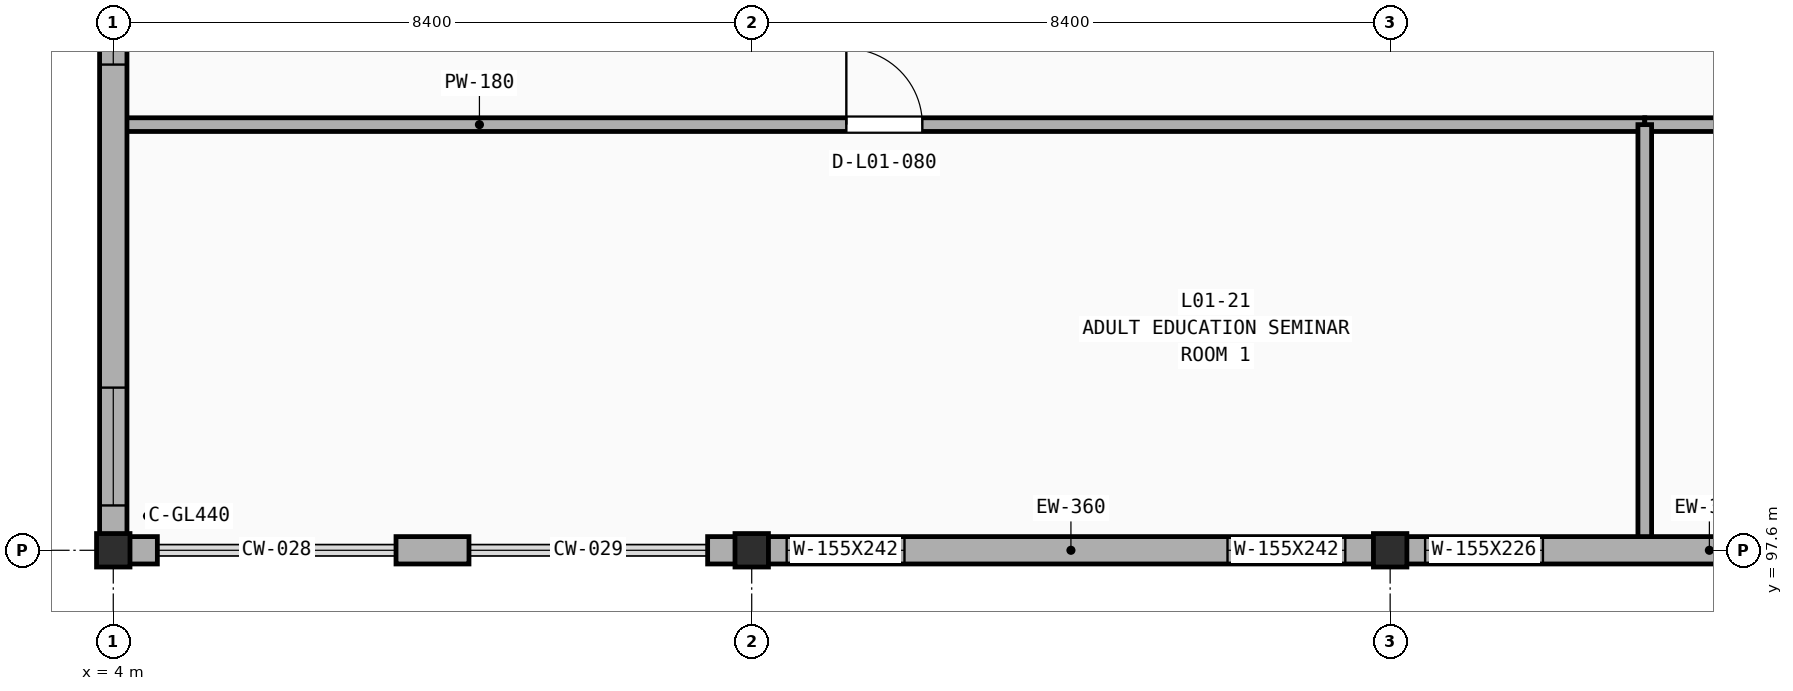
"""IFC4 building model, lengths in metres.
Left out: names, types, materials, properties, quantities, classifications, styles, units other than length and angle.
Written with IfcOpenShell. Run it as: python <this file> out.ifc"""

import sys

from ifc_helpers import new_model, si_unit, direction, frame, frame_2d, origin, origin_2d, place, context, subcontext, project, spatial, rectangle, extrude, element, fill, save


model = new_model("IFC4")
c1 = context("Model", 3, precision=1e-05, world=origin(), true_north=direction((0.0, 1.0)))
c2 = subcontext(c1, "Body", "Model", "MODEL_VIEW")
j1 = project(units=[si_unit("LENGTHUNIT", "METRE"), si_unit("PLANEANGLEUNIT", "RADIAN")], contexts=[c1])
p1 = place(None, origin())
s1 = spatial("IfcSite", under=j1, at=p1, CompositionType="ELEMENT")
p2 = place(p1, origin())
s2 = spatial("IfcBuilding", under=s1, at=p2, CompositionType="ELEMENT")
p3 = place(p2, frame((0.0, 0.0, 5.4)))
s3 = spatial("IfcBuildingStorey", under=s2, at=p3, CompositionType="ELEMENT", Elevation=5.4)
for number, where, z_axis, x_axis in (
    (1, (4.0, 97.6, 0.0), (0.0, 0.0, 1.0), (1.0, 0.0, 0.0)),
    (2, (12.4, 97.6, 0.0), (0.0, 0.0, 1.0), (1.0, 0.0, 0.0)),
    (3, (20.8, 97.6, 0.0), (0.0, 0.0, 1.0), (1.0, 0.0, 0.0)),
):
    element("IfcColumn", number, at=place(p3, frame(where, z_axis=z_axis, x_axis=x_axis)), inside=s3, PredefinedType="COLUMN", context=c2, shape_type="SweptSolid", body=[
        extrude(rectangle(XDim=0.44, YDim=0.44, at=origin_2d()), origin(), (0.0, 0.0, 1.0), 4.2),
    ])
p4 = place(p3, frame((4.14, 103.2, 0.0), z_axis=(0.0, 0.0, 1.0), x_axis=(1.0, 0.0, 0.0)))
e4 = element("IfcWall", 4, at=p4, inside=s3, PredefinedType="PARTITIONING", context=c2, shape_type="SweptSolid", body=[
    extrude(rectangle(XDim=20.01, YDim=0.18, at=frame_2d((10.005, 0.0))), origin(), (0.0, 0.0, 1.0), 3.37),
])
p5 = place(p4, frame((9.505, 0.0, -0.01)))
e5 = element("IfcOpeningElement", 5, at=p5, cuts=e4, PredefinedType="OPENING", context=c2, shape_type="SweptSolid", body=[
    extrude(rectangle(XDim=1.0, YDim=2.16, at=frame_2d((0.5, 1.08))), frame((0.0, 0.1, 0.0), z_axis=(0.0, -1.0, 0.0), x_axis=(1.0, 0.0, 0.0)), (0.0, 0.0, 1.0), 0.2),
])
p6 = place(p3, frame((24.15, 103.2, 0.0), z_axis=(0.0, 0.0, 1.0), x_axis=(1.0, 0.0, 0.0)))
e6 = element("IfcWall", 6, at=p6, inside=s3, PredefinedType="PARTITIONING", context=c2, shape_type="SweptSolid", body=[
    extrude(rectangle(XDim=20.2, YDim=0.18, at=frame_2d((10.1, 0.0))), origin(), (0.0, 0.0, 1.0), 3.37),
])
p7 = place(p6, frame((9.6, 0.0, -0.01)))
e7 = element("IfcOpeningElement", 7, at=p7, cuts=e6, PredefinedType="OPENING", context=c2, shape_type="SweptSolid", body=[
    extrude(rectangle(XDim=1.0, YDim=2.16, at=frame_2d((0.5, 1.08))), frame((0.0, 0.1, 0.0), z_axis=(0.0, -1.0, 0.0), x_axis=(1.0, 0.0, 0.0)), (0.0, 0.0, 1.0), 0.2),
])
p8 = place(p3, frame((24.15, 97.74, 0.0), z_axis=(0.0, 0.0, 1.0), x_axis=(0.0, 1.0, 0.0)))
e8 = element("IfcWall", 8, at=p8, inside=s3, PredefinedType="PARTITIONING", context=c2, shape_type="SweptSolid", body=[
    extrude(rectangle(XDim=5.46, YDim=0.18, at=frame_2d((2.73, 0.0))), origin(), (0.0, 0.0, 1.0), 3.52),
])
p9 = place(p3, frame((7.72, 97.6, 0.0), z_axis=(0.0, 0.0, 1.0), x_axis=(1.0, 0.0, 0.0)))
e9 = element("IfcWall", 9, at=p9, inside=s3, PredefinedType="SOLIDWALL", context=c2, shape_type="SweptSolid", body=[
    extrude(rectangle(XDim=0.96, YDim=0.36, at=frame_2d((0.48, 0.0))), origin(), (0.0, 0.0, 1.0), 3.31),
])
p10 = place(p3, frame((4.13, 97.6, 0.0), z_axis=(0.0, 0.0, 1.0), x_axis=(1.0, 0.0, 0.0)))
e10 = element("IfcWall", 10, at=p10, inside=s3, PredefinedType="SOLIDWALL", context=c2, shape_type="SweptSolid", body=[
    extrude(rectangle(XDim=0.45, YDim=0.36, at=frame_2d((0.225, 0.0))), origin(), (0.0, 0.0, 1.0), 3.31),
])
p11 = place(p3, frame((11.82, 97.6, 0.0), z_axis=(0.0, 0.0, 1.0), x_axis=(1.0, 0.0, 0.0)))
e11 = element("IfcWall", 11, at=p11, inside=s3, PredefinedType="SOLIDWALL", context=c2, shape_type="SweptSolid", body=[
    extrude(rectangle(XDim=0.45, YDim=0.36, at=frame_2d((0.225, 0.0))), origin(), (0.0, 0.0, 1.0), 3.31),
])
p12 = place(p3, frame((12.4, 97.6, 0.0), z_axis=(0.0, 0.0, 1.0), x_axis=(1.0, 0.0, 0.0)))
e12 = element("IfcWall", 12, at=p12, inside=s3, PredefinedType="SOLIDWALL", context=c2, shape_type="SweptSolid", body=[
    extrude(rectangle(XDim=8.4, YDim=0.36, at=frame_2d((4.2, 0.0))), origin(), (0.0, 0.0, 1.0), 3.31),
])
p13 = place(p12, frame((0.46, 0.0, 0.75)))
e13 = element("IfcOpeningElement", 13, at=p13, cuts=e12, PredefinedType="OPENING", context=c2, shape_type="SweptSolid", body=[
    extrude(rectangle(XDim=1.55, YDim=2.42, at=frame_2d((0.775, 1.21))), frame((0.0, 0.19, 0.0), z_axis=(0.0, -1.0, 0.0), x_axis=(1.0, 0.0, 0.0)), (0.0, 0.0, 1.0), 0.38),
])
p14 = place(p12, frame((6.26, 0.0, 0.75)))
e14 = element("IfcOpeningElement", 14, at=p14, cuts=e12, PredefinedType="OPENING", context=c2, shape_type="SweptSolid", body=[
    extrude(rectangle(XDim=1.55, YDim=2.42, at=frame_2d((0.775, 1.21))), frame((0.0, 0.19, 0.0), z_axis=(0.0, -1.0, 0.0), x_axis=(1.0, 0.0, 0.0)), (0.0, 0.0, 1.0), 0.38),
])
p15 = place(p3, frame((20.8, 97.6, 0.0), z_axis=(0.0, 0.0, 1.0), x_axis=(1.0, 0.0, 0.0)))
e15 = element("IfcWall", 15, at=p15, inside=s3, PredefinedType="SOLIDWALL", context=c2, shape_type="SweptSolid", body=[
    extrude(rectangle(XDim=8.4, YDim=0.36, at=frame_2d((4.2, 0.0))), origin(), (0.0, 0.0, 1.0), 3.15),
])
p16 = place(p15, frame((0.46, 0.0, 0.75)))
e16 = element("IfcOpeningElement", 16, at=p16, cuts=e15, PredefinedType="OPENING", context=c2, shape_type="SweptSolid", body=[
    extrude(rectangle(XDim=1.55, YDim=2.26, at=frame_2d((0.775, 1.13))), frame((0.0, 0.19, 0.0), z_axis=(0.0, -1.0, 0.0), x_axis=(1.0, 0.0, 0.0)), (0.0, 0.0, 1.0), 0.38),
])
p17 = place(p15, frame((6.26, 0.0, 0.75)))
e17 = element("IfcOpeningElement", 17, at=p17, cuts=e15, PredefinedType="OPENING", context=c2, shape_type="SweptSolid", body=[
    extrude(rectangle(XDim=1.55, YDim=2.26, at=frame_2d((0.775, 1.13))), frame((0.0, 0.19, 0.0), z_axis=(0.0, -1.0, 0.0), x_axis=(1.0, 0.0, 0.0)), (0.0, 0.0, 1.0), 0.38),
])
p18 = place(p3, frame((4.0, 106.0, 0.0), z_axis=(0.0, 0.0, 1.0), x_axis=(0.0, -1.0, 0.0)))
e18 = element("IfcWall", 18, at=p18, inside=s3, PredefinedType="SOLIDWALL", context=c2, shape_type="SweptSolid", body=[
    extrude(rectangle(XDim=8.4, YDim=0.36, at=frame_2d((4.2, 0.0))), origin(), (0.0, 0.0, 1.0), 3.31),
])
p19 = place(p18, frame((0.46, 0.0, 0.75)))
e19 = element("IfcOpeningElement", 19, at=p19, cuts=e18, PredefinedType="OPENING", context=c2, shape_type="SweptSolid", body=[
    extrude(rectangle(XDim=1.55, YDim=2.42, at=frame_2d((0.775, 1.21))), frame((0.0, 0.19, 0.0), z_axis=(0.0, -1.0, 0.0), x_axis=(1.0, 0.0, 0.0)), (0.0, 0.0, 1.0), 0.38),
])
p20 = place(p18, frame((6.26, 0.0, 0.75)))
e20 = element("IfcOpeningElement", 20, at=p20, cuts=e18, PredefinedType="OPENING", context=c2, shape_type="SweptSolid", body=[
    extrude(rectangle(XDim=1.55, YDim=2.42, at=frame_2d((0.775, 1.21))), frame((0.0, 0.19, 0.0), z_axis=(0.0, -1.0, 0.0), x_axis=(1.0, 0.0, 0.0)), (0.0, 0.0, 1.0), 0.38),
])
p21 = place(p5, frame((0.0, 0.0, 0.01)))
e21 = element("IfcDoor", 21, at=p21, inside=s3, OperationType="SINGLE_SWING_LEFT", PredefinedType="DOOR", context=c2, shape_type="SweptSolid", body=[
    extrude(rectangle(XDim=1.0, YDim=2.15, at=frame_2d((0.5, 1.075))), frame((0.0, 0.025, 0.0), z_axis=(0.0, -1.0, 0.0), x_axis=(1.0, 0.0, 0.0)), (0.0, 0.0, 1.0), 0.05),
])
fill(e5, e21)
p22 = place(p13, origin())
e22 = element("IfcWindow", 22, at=p22, inside=s3, PartitioningType="DOUBLE_PANEL_HORIZONTAL", PredefinedType="WINDOW", context=c2, shape_type="SweptSolid", body=[
    extrude(rectangle(XDim=1.55, YDim=2.42, at=frame_2d((0.775, 1.21))), frame((0.0, 0.03, 0.0), z_axis=(0.0, -1.0, 0.0), x_axis=(1.0, 0.0, 0.0)), (0.0, 0.0, 1.0), 0.06),
])
fill(e13, e22)
p23 = place(p14, origin())
e23 = element("IfcWindow", 23, at=p23, inside=s3, PartitioningType="DOUBLE_PANEL_HORIZONTAL", PredefinedType="WINDOW", context=c2, shape_type="SweptSolid", body=[
    extrude(rectangle(XDim=1.55, YDim=2.42, at=frame_2d((0.775, 1.21))), frame((0.0, 0.03, 0.0), z_axis=(0.0, -1.0, 0.0), x_axis=(1.0, 0.0, 0.0)), (0.0, 0.0, 1.0), 0.06),
])
fill(e14, e23)
p24 = place(p16, origin())
e24 = element("IfcWindow", 24, at=p24, inside=s3, PartitioningType="DOUBLE_PANEL_HORIZONTAL", PredefinedType="WINDOW", context=c2, shape_type="SweptSolid", body=[
    extrude(rectangle(XDim=1.55, YDim=2.26, at=frame_2d((0.775, 1.13))), frame((0.0, 0.03, 0.0), z_axis=(0.0, -1.0, 0.0), x_axis=(1.0, 0.0, 0.0)), (0.0, 0.0, 1.0), 0.06),
])
fill(e16, e24)
p25 = place(p19, origin())
e25 = element("IfcWindow", 25, at=p25, inside=s3, PartitioningType="DOUBLE_PANEL_HORIZONTAL", PredefinedType="WINDOW", context=c2, shape_type="SweptSolid", body=[
    extrude(rectangle(XDim=1.55, YDim=2.42, at=frame_2d((0.775, 1.21))), frame((0.0, 0.03, 0.0), z_axis=(0.0, -1.0, 0.0), x_axis=(1.0, 0.0, 0.0)), (0.0, 0.0, 1.0), 0.06),
])
fill(e19, e25)
p26 = place(p20, origin())
e26 = element("IfcWindow", 26, at=p26, inside=s3, PartitioningType="DOUBLE_PANEL_HORIZONTAL", PredefinedType="WINDOW", context=c2, shape_type="SweptSolid", body=[
    extrude(rectangle(XDim=1.55, YDim=2.42, at=frame_2d((0.775, 1.21))), frame((0.0, 0.03, 0.0), z_axis=(0.0, -1.0, 0.0), x_axis=(1.0, 0.0, 0.0)), (0.0, 0.0, 1.0), 0.06),
])
fill(e20, e26)
save(model, sys.argv[1])
